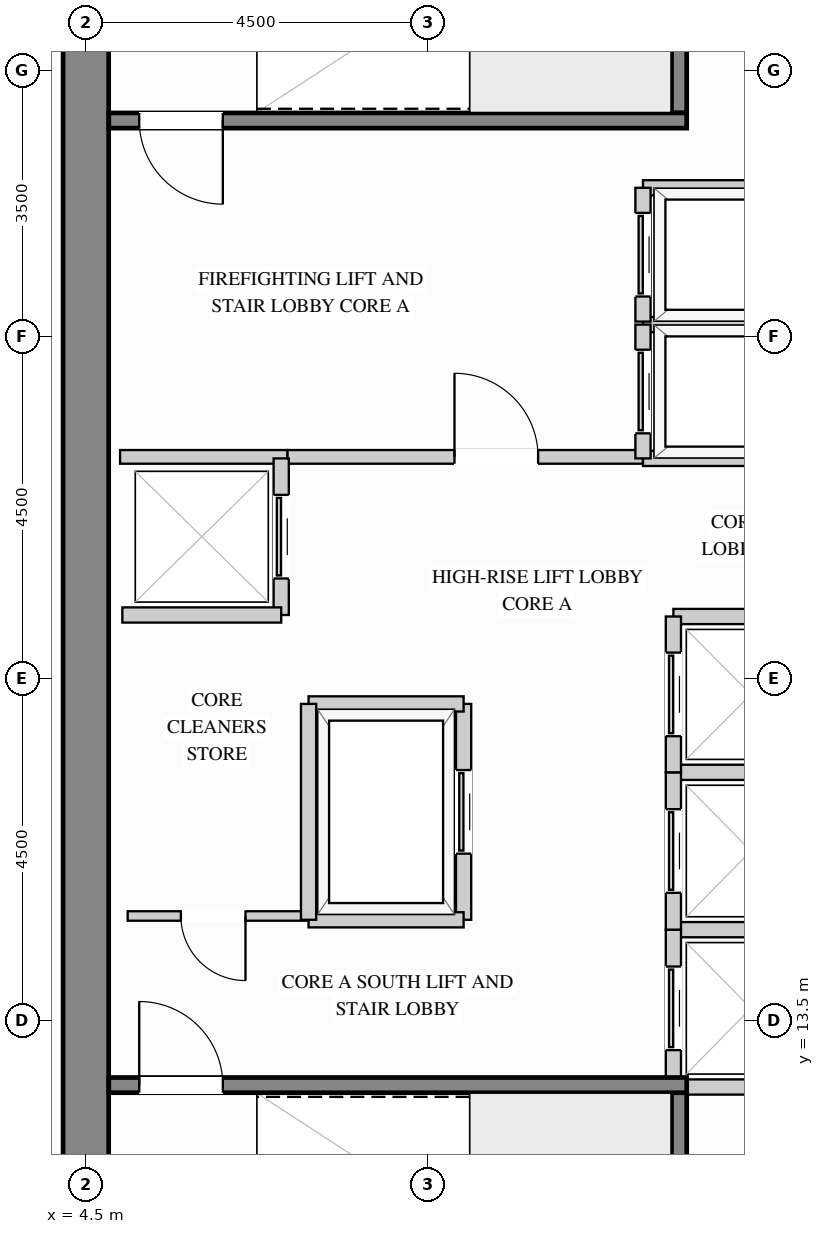
"""IFC4 building model, lengths in metres.
Left out: names, types, materials, properties, quantities, classifications, styles, units other than length and angle.
Written with IfcOpenShell. Run it as: python <this file> out.ifc"""

import sys

from ifc_helpers import new_model, si_unit, direction, frame, frame_2d, origin, place, context, subcontext, project, spatial, rectangle, extrude, source, transform, mapped, element, fill, save


model = new_model("IFC4")
c1 = context("Model", 3, precision=1e-05, world=origin(), true_north=direction((0.0, 1.0)))
c2 = subcontext(c1, "Body", "Model", "MODEL_VIEW")
j1 = project(units=[si_unit("LENGTHUNIT", "METRE"), si_unit("PLANEANGLEUNIT", "RADIAN")], contexts=[c1])
p1 = place(None, origin())
s1 = spatial("IfcSite", under=j1, at=p1, CompositionType="ELEMENT")
p2 = place(p1, origin())
s2 = spatial("IfcBuilding", under=s1, at=p2, CompositionType="ELEMENT")
p3 = place(p2, frame((0.0, 0.0, 146.7)))
s3 = spatial("IfcBuildingStorey", under=s2, at=p3, CompositionType="ELEMENT", Elevation=146.7)
m1 = source(origin(), c2, "Body", "SweptSolid", [
    extrude(rectangle(XDim=20.4, YDim=0.6, at=frame_2d((10.2, 0.0))), origin(), (0.0, 0.0, 1.0), 3.4),
])
p4 = place(p3, frame((4.5, 8.8, 0.0), z_axis=(0.0, 0.0, 1.0), x_axis=(0.0, 1.0, 0.0)))
e1 = element("IfcWall", 1, at=p4, inside=s3, PredefinedType="SHEAR", context=c2, shape_type="MappedRepresentation", body=[
    mapped(m1, transform((0.0, 0.0, 0.0), x_axis=(1.0, 0.0, 0.0), y_axis=(0.0, 1.0, 0.0), z_axis=(0.0, 0.0, 1.0))),
])
p5 = place(p3, frame((7.15, 20.92, 0.0), z_axis=(0.0, 0.0, 1.0), x_axis=(1.0, 0.0, 0.0)))
e2 = element("IfcWall", 2, at=p5, inside=s3, PredefinedType="PARTITIONING", context=c2, shape_type="SweptSolid", body=[
    extrude(rectangle(XDim=4.68, YDim=0.18, at=frame_2d((2.34, 0.0))), origin(), (0.0, 0.0, 1.0), 3.385),
])
p6 = place(p5, frame((2.2, 0.0, 0.0)))
e3 = element("IfcOpeningElement", 3, at=p6, cuts=e2, PredefinedType="OPENING", context=c2, shape_type="SweptSolid", body=[
    extrude(rectangle(XDim=1.1, YDim=2.15, at=frame_2d((0.55, 1.075))), frame((0.0, 0.1, 0.0), z_axis=(0.0, -1.0, 0.0), x_axis=(1.0, 0.0, 0.0)), (0.0, 0.0, 1.0), 0.2),
])
m2 = source(origin(), c2, "Body", "SweptSolid", [
    extrude(rectangle(XDim=2.2, YDim=0.18, at=frame_2d((1.1, 0.0))), origin(), (0.0, 0.0, 1.0), 3.385),
])
p7 = place(p3, frame((4.95, 20.92, 0.0), z_axis=(0.0, 0.0, 1.0), x_axis=(1.0, 0.0, 0.0)))
e4 = element("IfcWall", 4, at=p7, inside=s3, PredefinedType="PARTITIONING", context=c2, shape_type="MappedRepresentation", body=[
    mapped(m2, transform((0.0, 0.0, 0.0), x_axis=(1.0, 0.0, 0.0), y_axis=(0.0, 1.0, 0.0), z_axis=(0.0, 0.0, 1.0))),
])
p8 = place(p3, frame((5.05, 14.88, 0.0), z_axis=(0.0, 0.0, 1.0), x_axis=(1.0, 0.0, 0.0)))
e5 = element("IfcWall", 5, at=p8, inside=s3, PredefinedType="PARTITIONING", context=c2, shape_type="SweptSolid", body=[
    extrude(rectangle(XDim=2.35, YDim=0.125, at=frame_2d((1.175, 0.0))), origin(), (0.0, 0.0, 1.0), 3.385),
])
p9 = place(p8, frame((0.7, 0.0, 0.0)))
e6 = element("IfcOpeningElement", 6, at=p9, cuts=e5, PredefinedType="OPENING", context=c2, shape_type="SweptSolid", body=[
    extrude(rectangle(XDim=0.85, YDim=2.1, at=frame_2d((0.425, 1.05))), frame((0.0, 0.073, 0.0), z_axis=(0.0, -1.0, 0.0), x_axis=(1.0, 0.0, 0.0)), (0.0, 0.0, 1.0), 0.145),
])
m3 = source(origin(), c2, "Body", "SweptSolid", [
    extrude(rectangle(XDim=2.34, YDim=0.2, at=frame_2d((1.17, 0.0))), origin(), (0.0, 0.0, 1.0), 3.385),
])
for number, where, z_axis, x_axis in (
    (7, (11.83, 22.66, 0.0), (0.0, 0.0, 1.0), (1.0, 0.0, 0.0)),
    (8, (11.83, 20.9, 0.0), (0.0, 0.0, 1.0), (1.0, 0.0, 0.0)),
):
    element("IfcWall", number, at=place(p3, frame(where, z_axis=z_axis, x_axis=x_axis)), inside=s3, PredefinedType="PARTITIONING", context=c2, shape_type="MappedRepresentation", body=[
        mapped(m3, transform((0.0, 0.0, 0.0), x_axis=(1.0, 0.0, 0.0), y_axis=(0.0, 1.0, 0.0), z_axis=(0.0, 0.0, 1.0))),
    ])
p10 = place(p3, frame((11.83, 20.9, 0.0), z_axis=(0.0, 0.0, 1.0), x_axis=(0.0, 1.0, 0.0)))
e9 = element("IfcWall", 9, at=p10, inside=s3, PredefinedType="PARTITIONING", context=c2, shape_type="SweptSolid", body=[
    extrude(rectangle(XDim=1.76, YDim=0.2, at=frame_2d((0.88, 0.0))), origin(), (0.0, 0.0, 1.0), 3.385),
])
p11 = place(p10, frame((0.33, 0.0, 0.0)))
e10 = element("IfcOpeningElement", 10, at=p11, cuts=e9, PredefinedType="OPENING", context=c2, shape_type="SweptSolid", body=[
    extrude(rectangle(XDim=1.1, YDim=2.2, at=frame_2d((0.55, 1.1))), frame((0.0, 0.11, 0.0), z_axis=(0.0, -1.0, 0.0), x_axis=(1.0, 0.0, 0.0)), (0.0, 0.0, 1.0), 0.22),
])
p12 = place(p3, frame((11.83, 24.46, 0.0), z_axis=(0.0, 0.0, 1.0), x_axis=(1.0, 0.0, 0.0)))
e11 = element("IfcWall", 11, at=p12, inside=s3, PredefinedType="PARTITIONING", context=c2, shape_type="MappedRepresentation", body=[
    mapped(m3, transform((0.0, 0.0, 0.0), x_axis=(1.0, 0.0, 0.0), y_axis=(0.0, 1.0, 0.0), z_axis=(0.0, 0.0, 1.0))),
])
p13 = place(p3, frame((11.83, 22.7, 0.0), z_axis=(0.0, 0.0, 1.0), x_axis=(0.0, 1.0, 0.0)))
e12 = element("IfcWall", 12, at=p13, inside=s3, PredefinedType="PARTITIONING", context=c2, shape_type="SweptSolid", body=[
    extrude(rectangle(XDim=1.76, YDim=0.2, at=frame_2d((0.88, 0.0))), origin(), (0.0, 0.0, 1.0), 3.385),
])
p14 = place(p13, frame((0.33, 0.0, 0.0)))
e13 = element("IfcOpeningElement", 13, at=p14, cuts=e12, PredefinedType="OPENING", context=c2, shape_type="SweptSolid", body=[
    extrude(rectangle(XDim=1.1, YDim=2.2, at=frame_2d((0.55, 1.1))), frame((0.0, 0.11, 0.0), z_axis=(0.0, -1.0, 0.0), x_axis=(1.0, 0.0, 0.0)), (0.0, 0.0, 1.0), 0.22),
])
m4 = source(origin(), c2, "Body", "SweptSolid", [
    extrude(rectangle(XDim=1.94, YDim=0.2, at=frame_2d((0.97, 0.0))), origin(), (0.0, 0.0, 1.0), 3.385),
])
for number, where, z_axis, x_axis in (
    (14, (12.23, 14.7, 0.0), (0.0, 0.0, 1.0), (1.0, 0.0, 0.0)),
    (15, (12.23, 12.63, 0.0), (0.0, 0.0, 1.0), (1.0, 0.0, 0.0)),
):
    element("IfcWall", number, at=place(p3, frame(where, z_axis=z_axis, x_axis=x_axis)), inside=s3, PredefinedType="PARTITIONING", context=c2, shape_type="MappedRepresentation", body=[
        mapped(m4, transform((0.0, 0.0, 0.0), x_axis=(1.0, 0.0, 0.0), y_axis=(0.0, 1.0, 0.0), z_axis=(0.0, 0.0, 1.0))),
    ])
p15 = place(p3, frame((12.23, 12.63, 0.0), z_axis=(0.0, 0.0, 1.0), x_axis=(0.0, 1.0, 0.0)))
e16 = element("IfcWall", 16, at=p15, inside=s3, PredefinedType="PARTITIONING", context=c2, shape_type="SweptSolid", body=[
    extrude(rectangle(XDim=2.07, YDim=0.2, at=frame_2d((1.035, 0.0))), origin(), (0.0, 0.0, 1.0), 3.385),
])
p16 = place(p15, frame((0.485, 0.0, 0.0)))
e17 = element("IfcOpeningElement", 17, at=p16, cuts=e16, PredefinedType="OPENING", context=c2, shape_type="SweptSolid", body=[
    extrude(rectangle(XDim=1.1, YDim=2.2, at=frame_2d((0.55, 1.1))), frame((0.0, 0.11, 0.0), z_axis=(0.0, -1.0, 0.0), x_axis=(1.0, 0.0, 0.0)), (0.0, 0.0, 1.0), 0.22),
])
p17 = place(p3, frame((12.23, 16.77, 0.0), z_axis=(0.0, 0.0, 1.0), x_axis=(1.0, 0.0, 0.0)))
e18 = element("IfcWall", 18, at=p17, inside=s3, PredefinedType="PARTITIONING", context=c2, shape_type="MappedRepresentation", body=[
    mapped(m4, transform((0.0, 0.0, 0.0), x_axis=(1.0, 0.0, 0.0), y_axis=(0.0, 1.0, 0.0), z_axis=(0.0, 0.0, 1.0))),
])
p18 = place(p3, frame((12.23, 14.7, 0.0), z_axis=(0.0, 0.0, 1.0), x_axis=(0.0, 1.0, 0.0)))
e19 = element("IfcWall", 19, at=p18, inside=s3, PredefinedType="PARTITIONING", context=c2, shape_type="SweptSolid", body=[
    extrude(rectangle(XDim=2.07, YDim=0.2, at=frame_2d((1.035, 0.0))), origin(), (0.0, 0.0, 1.0), 3.385),
])
p19 = place(p18, frame((0.485, 0.0, 0.0)))
e20 = element("IfcOpeningElement", 20, at=p19, cuts=e19, PredefinedType="OPENING", context=c2, shape_type="SweptSolid", body=[
    extrude(rectangle(XDim=1.1, YDim=2.2, at=frame_2d((0.55, 1.1))), frame((0.0, 0.11, 0.0), z_axis=(0.0, -1.0, 0.0), x_axis=(1.0, 0.0, 0.0)), (0.0, 0.0, 1.0), 0.22),
])
p20 = place(p3, frame((12.23, 18.82, 0.0), z_axis=(0.0, 0.0, 1.0), x_axis=(1.0, 0.0, 0.0)))
e21 = element("IfcWall", 21, at=p20, inside=s3, PredefinedType="PARTITIONING", context=c2, shape_type="MappedRepresentation", body=[
    mapped(m4, transform((0.0, 0.0, 0.0), x_axis=(1.0, 0.0, 0.0), y_axis=(0.0, 1.0, 0.0), z_axis=(0.0, 0.0, 1.0))),
])
p21 = place(p3, frame((12.23, 16.77, 0.0), z_axis=(0.0, 0.0, 1.0), x_axis=(0.0, 1.0, 0.0)))
e22 = element("IfcWall", 22, at=p21, inside=s3, PredefinedType="PARTITIONING", context=c2, shape_type="SweptSolid", body=[
    extrude(rectangle(XDim=2.05, YDim=0.2, at=frame_2d((1.025, 0.0))), origin(), (0.0, 0.0, 1.0), 3.385),
])
p22 = place(p21, frame((0.475, 0.0, 0.0)))
e23 = element("IfcOpeningElement", 23, at=p22, cuts=e22, PredefinedType="OPENING", context=c2, shape_type="SweptSolid", body=[
    extrude(rectangle(XDim=1.1, YDim=2.2, at=frame_2d((0.55, 1.1))), frame((0.0, 0.11, 0.0), z_axis=(0.0, -1.0, 0.0), x_axis=(1.0, 0.0, 0.0)), (0.0, 0.0, 1.0), 0.22),
])
p23 = place(p3, frame((7.07, 18.84, 0.0), z_axis=(0.0, 0.0, 1.0), x_axis=(0.0, 1.0, 0.0)))
e24 = element("IfcWall", 24, at=p23, inside=s3, PredefinedType="PARTITIONING", context=c2, shape_type="SweptSolid", body=[
    extrude(rectangle(XDim=2.06, YDim=0.2, at=frame_2d((1.03, 0.0))), origin(), (0.0, 0.0, 1.0), 3.385),
])
p24 = place(p23, frame((0.48, 0.0, 0.0)))
e25 = element("IfcOpeningElement", 25, at=p24, cuts=e24, PredefinedType="OPENING", context=c2, shape_type="SweptSolid", body=[
    extrude(rectangle(XDim=1.1, YDim=2.2, at=frame_2d((0.55, 1.1))), frame((0.0, 0.11, 0.0), z_axis=(0.0, -1.0, 0.0), x_axis=(1.0, 0.0, 0.0)), (0.0, 0.0, 1.0), 0.22),
])
m5 = source(origin(), c2, "Body", "SweptSolid", [
    extrude(rectangle(XDim=2.09, YDim=0.2, at=frame_2d((1.045, 0.0))), origin(), (0.0, 0.0, 1.0), 3.385),
])
p25 = place(p3, frame((4.98, 18.84, 0.0), z_axis=(0.0, 0.0, 1.0), x_axis=(1.0, 0.0, 0.0)))
e26 = element("IfcWall", 26, at=p25, inside=s3, PredefinedType="PARTITIONING", context=c2, shape_type="MappedRepresentation", body=[
    mapped(m5, transform((0.0, 0.0, 0.0), x_axis=(1.0, 0.0, 0.0), y_axis=(0.0, 1.0, 0.0), z_axis=(0.0, 0.0, 1.0))),
])
p26 = place(p3, frame((9.47, 14.83, 0.0), z_axis=(0.0, 0.0, 1.0), x_axis=(0.0, 1.0, 0.0)))
e27 = element("IfcWall", 27, at=p26, inside=s3, PredefinedType="PARTITIONING", context=c2, shape_type="SweptSolid", body=[
    extrude(rectangle(XDim=2.84, YDim=0.2, at=frame_2d((1.42, 0.0))), origin(), (0.0, 0.0, 1.0), 3.385),
])
p27 = place(p26, frame((0.87, 0.0, 0.0)))
e28 = element("IfcOpeningElement", 28, at=p27, cuts=e27, PredefinedType="OPENING", context=c2, shape_type="SweptSolid", body=[
    extrude(rectangle(XDim=1.1, YDim=2.2, at=frame_2d((0.55, 1.1))), frame((0.0, 0.11, 0.0), z_axis=(0.0, -1.0, 0.0), x_axis=(1.0, 0.0, 0.0)), (0.0, 0.0, 1.0), 0.22),
])
m6 = source(origin(), c2, "Body", "SweptSolid", [
    extrude(rectangle(XDim=2.04, YDim=0.2, at=frame_2d((1.02, 0.0))), origin(), (0.0, 0.0, 1.0), 3.385),
])
for number, where, z_axis, x_axis in (
    (29, (7.43, 17.67, 0.0), (0.0, 0.0, 1.0), (1.0, 0.0, 0.0)),
    (30, (7.43, 14.83, 0.0), (0.0, 0.0, 1.0), (1.0, 0.0, 0.0)),
):
    element("IfcWall", number, at=place(p3, frame(where, z_axis=z_axis, x_axis=x_axis)), inside=s3, PredefinedType="PARTITIONING", context=c2, shape_type="MappedRepresentation", body=[
        mapped(m6, transform((0.0, 0.0, 0.0), x_axis=(1.0, 0.0, 0.0), y_axis=(0.0, 1.0, 0.0), z_axis=(0.0, 0.0, 1.0))),
    ])
m7 = source(origin(), c2, "Body", "SweptSolid", [
    extrude(rectangle(XDim=2.84, YDim=0.2, at=frame_2d((1.42, 0.0))), origin(), (0.0, 0.0, 1.0), 3.385),
])
p28 = place(p3, frame((7.43, 14.83, 0.0), z_axis=(0.0, 0.0, 1.0), x_axis=(0.0, 1.0, 0.0)))
e31 = element("IfcWall", 31, at=p28, inside=s3, PredefinedType="PARTITIONING", context=c2, shape_type="MappedRepresentation", body=[
    mapped(m7, transform((0.0, 0.0, 0.0), x_axis=(1.0, 0.0, 0.0), y_axis=(0.0, 1.0, 0.0), z_axis=(0.0, 0.0, 1.0))),
])
m8 = source(origin(), c2, "Body", "SweptSolid", [
    extrude(rectangle(XDim=3.753, YDim=0.2, at=frame_2d((1.876, 0.0))), origin(), (0.0, 0.0, 1.0), 3.4),
])
p29 = place(p3, frame((12.305, 8.802, 0.0), z_axis=(0.0, 0.0, 1.0), x_axis=(0.0, 1.0, 0.0)))
e32 = element("IfcWall", 32, at=p29, inside=s3, PredefinedType="SHEAR", context=c2, shape_type="MappedRepresentation", body=[
    mapped(m8, transform((0.0, 0.0, 0.0), x_axis=(1.0, 0.0, 0.0), y_axis=(0.0, 1.0, 0.0), z_axis=(0.0, 0.0, 1.0))),
])
p30 = place(p3, frame((4.802, 12.655, 0.0), z_axis=(0.0, 0.0, 1.0), x_axis=(1.0, 0.0, 0.0)))
e33 = element("IfcWall", 33, at=p30, inside=s3, PredefinedType="SHEAR", context=c2, shape_type="SweptSolid", body=[
    extrude(rectangle(XDim=7.603, YDim=0.2, at=frame_2d((3.802, 0.0))), origin(), (0.0, 0.0, 1.0), 3.4),
])
p31 = place(p30, frame((0.4, 0.0, 0.0)))
e34 = element("IfcOpeningElement", 34, at=p31, cuts=e33, PredefinedType="OPENING", context=c2, shape_type="SweptSolid", body=[
    extrude(rectangle(XDim=1.1, YDim=2.15, at=frame_2d((0.55, 1.075))), frame((0.0, 0.11, 0.0), z_axis=(0.0, -1.0, 0.0), x_axis=(1.0, 0.0, 0.0)), (0.0, 0.0, 1.0), 0.22),
])
p32 = place(p3, frame((12.305, 25.445, 0.0), z_axis=(0.0, 0.0, 1.0), x_axis=(0.0, 1.0, 0.0)))
e35 = element("IfcWall", 35, at=p32, inside=s3, PredefinedType="SHEAR", context=c2, shape_type="MappedRepresentation", body=[
    mapped(m8, transform((0.0, 0.0, 0.0), x_axis=(1.0, 0.0, 0.0), y_axis=(0.0, 1.0, 0.0), z_axis=(0.0, 0.0, 1.0))),
])
p33 = place(p3, frame((4.802, 25.345, 0.0), z_axis=(0.0, 0.0, 1.0), x_axis=(1.0, 0.0, 0.0)))
e36 = element("IfcWall", 36, at=p33, inside=s3, PredefinedType="SHEAR", context=c2, shape_type="SweptSolid", body=[
    extrude(rectangle(XDim=7.603, YDim=0.2, at=frame_2d((3.802, 0.0))), origin(), (0.0, 0.0, 1.0), 3.4),
])
p34 = place(p33, frame((0.4, 0.0, 0.0)))
e37 = element("IfcOpeningElement", 37, at=p34, cuts=e36, PredefinedType="OPENING", context=c2, shape_type="SweptSolid", body=[
    extrude(rectangle(XDim=1.1, YDim=2.15, at=frame_2d((0.55, 1.075))), frame((0.0, 0.11, 0.0), z_axis=(0.0, -1.0, 0.0), x_axis=(1.0, 0.0, 0.0)), (0.0, 0.0, 1.0), 0.22),
])
m9 = source(origin(), c2, "Body", "SweptSolid", [
    extrude(rectangle(XDim=1.1, YDim=2.15, at=frame_2d((0.55, 1.075))), frame((0.0, 0.025, 0.0), z_axis=(0.0, -1.0, 0.0), x_axis=(1.0, 0.0, 0.0)), (0.0, 0.0, 1.0), 0.05),
])
p35 = place(p6, origin())
e38 = element("IfcDoor", 38, at=p35, inside=s3, OperationType="SINGLE_SWING_LEFT", PredefinedType="DOOR", context=c2, shape_type="MappedRepresentation", body=[
    mapped(m9, transform((0.0, 0.0, 0.0), x_axis=(1.0, 0.0, 0.0), y_axis=(0.0, 1.0, 0.0), z_axis=(0.0, 0.0, 1.0))),
])
fill(e3, e38)
m10 = source(origin(), c2, "Body", "SweptSolid", [
    extrude(rectangle(XDim=1.1, YDim=2.2, at=frame_2d((0.55, 1.1))), frame((0.0, 0.025, 0.0), z_axis=(0.0, -1.0, 0.0), x_axis=(1.0, 0.0, 0.0)), (0.0, 0.0, 1.0), 0.05),
])
p36 = place(p11, origin())
e39 = element("IfcDoor", 39, at=p36, inside=s3, OperationType="SLIDING_TO_LEFT", PredefinedType="DOOR", context=c2, shape_type="MappedRepresentation", body=[
    mapped(m10, transform((0.0, 0.0, 0.0), x_axis=(1.0, 0.0, 0.0), y_axis=(0.0, 1.0, 0.0), z_axis=(0.0, 0.0, 1.0))),
])
fill(e10, e39)
p37 = place(p14, origin())
e40 = element("IfcDoor", 40, at=p37, inside=s3, OperationType="SLIDING_TO_LEFT", PredefinedType="DOOR", context=c2, shape_type="MappedRepresentation", body=[
    mapped(m10, transform((0.0, 0.0, 0.0), x_axis=(1.0, 0.0, 0.0), y_axis=(0.0, 1.0, 0.0), z_axis=(0.0, 0.0, 1.0))),
])
fill(e13, e40)
p38 = place(p16, origin())
e41 = element("IfcDoor", 41, at=p38, inside=s3, OperationType="SLIDING_TO_LEFT", PredefinedType="DOOR", context=c2, shape_type="MappedRepresentation", body=[
    mapped(m10, transform((0.0, 0.0, 0.0), x_axis=(1.0, 0.0, 0.0), y_axis=(0.0, 1.0, 0.0), z_axis=(0.0, 0.0, 1.0))),
])
fill(e17, e41)
p39 = place(p19, origin())
e42 = element("IfcDoor", 42, at=p39, inside=s3, OperationType="SLIDING_TO_LEFT", PredefinedType="DOOR", context=c2, shape_type="MappedRepresentation", body=[
    mapped(m10, transform((0.0, 0.0, 0.0), x_axis=(1.0, 0.0, 0.0), y_axis=(0.0, 1.0, 0.0), z_axis=(0.0, 0.0, 1.0))),
])
fill(e20, e42)
p40 = place(p22, origin())
e43 = element("IfcDoor", 43, at=p40, inside=s3, OperationType="SLIDING_TO_LEFT", PredefinedType="DOOR", context=c2, shape_type="MappedRepresentation", body=[
    mapped(m10, transform((0.0, 0.0, 0.0), x_axis=(1.0, 0.0, 0.0), y_axis=(0.0, 1.0, 0.0), z_axis=(0.0, 0.0, 1.0))),
])
fill(e23, e43)
p41 = place(p24, origin())
e44 = element("IfcDoor", 44, at=p41, inside=s3, OperationType="SLIDING_TO_LEFT", PredefinedType="DOOR", context=c2, shape_type="MappedRepresentation", body=[
    mapped(m10, transform((0.0, 0.0, 0.0), x_axis=(1.0, 0.0, 0.0), y_axis=(0.0, 1.0, 0.0), z_axis=(0.0, 0.0, 1.0))),
])
fill(e25, e44)
p42 = place(p27, origin())
e45 = element("IfcDoor", 45, at=p42, inside=s3, OperationType="SLIDING_TO_LEFT", PredefinedType="DOOR", context=c2, shape_type="MappedRepresentation", body=[
    mapped(m10, transform((0.0, 0.0, 0.0), x_axis=(1.0, 0.0, 0.0), y_axis=(0.0, 1.0, 0.0), z_axis=(0.0, 0.0, 1.0))),
])
fill(e28, e45)
m11 = source(origin(), c2, "Body", "SweptSolid", [
    extrude(rectangle(XDim=0.85, YDim=2.1, at=frame_2d((0.425, 1.05))), frame((0.0, 0.025, 0.0), z_axis=(0.0, -1.0, 0.0), x_axis=(1.0, 0.0, 0.0)), (0.0, 0.0, 1.0), 0.05),
])
p43 = place(p9, origin())
e46 = element("IfcDoor", 46, at=p43, inside=s3, OperationType="SINGLE_SWING_RIGHT", PredefinedType="DOOR", context=c2, shape_type="MappedRepresentation", body=[
    mapped(m11, transform((0.0, 0.0, 0.0), x_axis=(1.0, 0.0, 0.0), y_axis=(0.0, 1.0, 0.0), z_axis=(0.0, 0.0, 1.0))),
])
fill(e6, e46)
m12 = source(origin(), c2, "Body", "SweptSolid", [
    extrude(rectangle(XDim=1.1, YDim=2.15, at=frame_2d((0.55, 1.075))), frame((0.0, 0.025, 0.0), z_axis=(0.0, -1.0, 0.0), x_axis=(1.0, 0.0, 0.0)), (0.0, 0.0, 1.0), 0.05),
])
p44 = place(p31, origin())
e47 = element("IfcDoor", 47, at=p44, inside=s3, OperationType="SINGLE_SWING_LEFT", PredefinedType="DOOR", context=c2, shape_type="MappedRepresentation", body=[
    mapped(m12, transform((0.0, 0.0, 0.0), x_axis=(1.0, 0.0, 0.0), y_axis=(0.0, 1.0, 0.0), z_axis=(0.0, 0.0, 1.0))),
])
fill(e34, e47)
p45 = place(p34, origin())
e48 = element("IfcDoor", 48, at=p45, inside=s3, OperationType="SINGLE_SWING_RIGHT", PredefinedType="DOOR", context=c2, shape_type="MappedRepresentation", body=[
    mapped(m12, transform((0.0, 0.0, 0.0), x_axis=(1.0, 0.0, 0.0), y_axis=(0.0, 1.0, 0.0), z_axis=(0.0, 0.0, 1.0))),
])
fill(e37, e48)
save(model, sys.argv[1])
